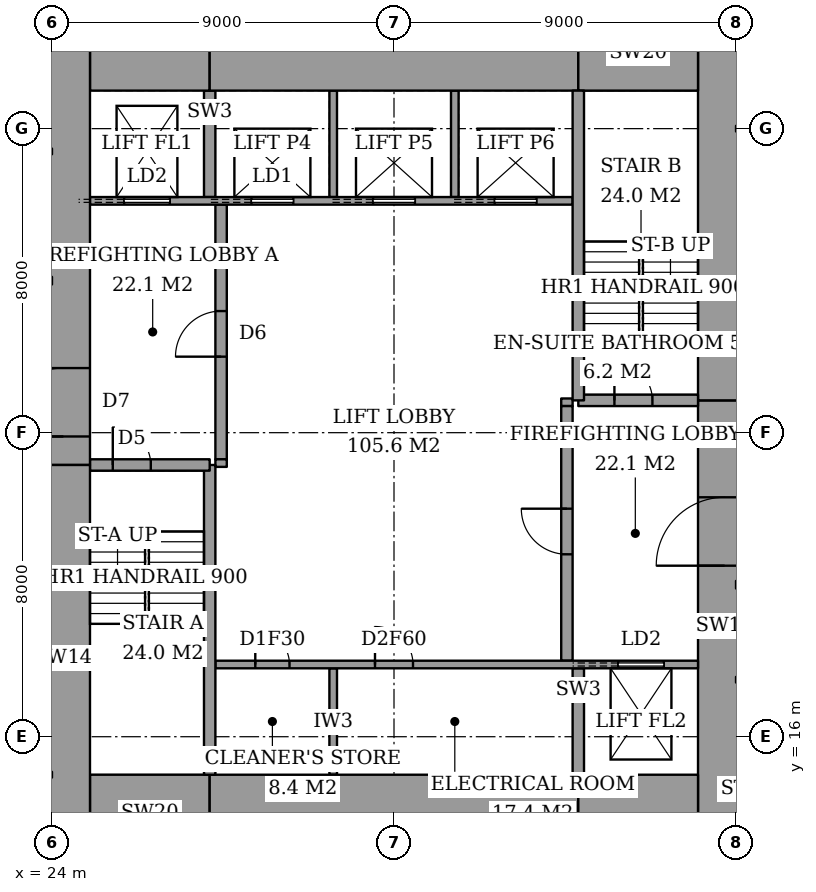
"""IFC4 building model, lengths in metres.
Left out: names, types, materials, properties, quantities, classifications, styles, units other than length and angle.
Written with IfcOpenShell. Run it as: python <this file> out.ifc"""

import sys

from ifc_helpers import new_model, si_unit, direction, frame, frame_2d, origin, place, context, subcontext, project, spatial, rectangle, extrude, element, fill, save


model = new_model("IFC4")
c1 = context("Model", 3, precision=1e-05, world=origin(), true_north=direction((0.0, 1.0)))
c2 = subcontext(c1, "Body", "Model", "MODEL_VIEW")
j1 = project(units=[si_unit("LENGTHUNIT", "METRE"), si_unit("PLANEANGLEUNIT", "RADIAN")], contexts=[c1])
p1 = place(None, origin())
s1 = spatial("IfcSite", under=j1, at=p1, CompositionType="ELEMENT")
p2 = place(p1, origin())
s2 = spatial("IfcBuilding", under=s1, at=p2, CompositionType="ELEMENT")
p3 = place(p2, frame((0.0, 0.0, 214.6)))
s3 = spatial("IfcBuildingStorey", under=s2, at=p3, CompositionType="ELEMENT", Elevation=214.6)
p4 = place(p3, frame((25.0, 14.0, 0.0), z_axis=(0.0, 0.0, 1.0), x_axis=(1.0, 0.0, 0.0)))
e1 = element("IfcWall", 1, at=p4, inside=s3, PredefinedType="SHEAR", context=c2, shape_type="SweptSolid", body=[
    extrude(rectangle(XDim=3.15, YDim=2.0, at=frame_2d((1.575, 0.0))), origin(), (0.0, 0.0, 1.0), 3.6),
])
p5 = place(p3, frame((28.15, 14.0, 0.0), z_axis=(0.0, 0.0, 1.0), x_axis=(1.0, 0.0, 0.0)))
e2 = element("IfcWall", 2, at=p5, inside=s3, PredefinedType="SHEAR", context=c2, shape_type="SweptSolid", body=[
    extrude(rectangle(XDim=9.7, YDim=2.0, at=frame_2d((4.85, 0.0))), origin(), (0.0, 0.0, 1.0), 3.6),
])
for number, where, z_axis, x_axis in (
    (3, (37.85, 14.0, 0.0), (0.0, 0.0, 1.0), (1.0, 0.0, 0.0)),
    (4, (25.0, 34.0, 0.0), (0.0, 0.0, 1.0), (1.0, 0.0, 0.0)),
):
    element("IfcWall", number, at=place(p3, frame(where, z_axis=z_axis, x_axis=x_axis)), inside=s3, PredefinedType="SHEAR", context=c2, shape_type="SweptSolid", body=[
        extrude(rectangle(XDim=3.15, YDim=2.0, at=frame_2d((1.575, 0.0))), origin(), (0.0, 0.0, 1.0), 3.6),
    ])
p6 = place(p3, frame((28.15, 34.0, 0.0), z_axis=(0.0, 0.0, 1.0), x_axis=(1.0, 0.0, 0.0)))
e5 = element("IfcWall", 5, at=p6, inside=s3, PredefinedType="SHEAR", context=c2, shape_type="SweptSolid", body=[
    extrude(rectangle(XDim=9.7, YDim=2.0, at=frame_2d((4.85, 0.0))), origin(), (0.0, 0.0, 1.0), 3.6),
])
p7 = place(p3, frame((37.85, 34.0, 0.0), z_axis=(0.0, 0.0, 1.0), x_axis=(1.0, 0.0, 0.0)))
e6 = element("IfcWall", 6, at=p7, inside=s3, PredefinedType="SHEAR", context=c2, shape_type="SweptSolid", body=[
    extrude(rectangle(XDim=3.15, YDim=2.0, at=frame_2d((1.575, 0.0))), origin(), (0.0, 0.0, 1.0), 3.6),
])
p8 = place(p3, frame((24.3, 13.0, 0.0), z_axis=(0.0, 0.0, 1.0), x_axis=(0.0, 1.0, 0.0)))
e7 = element("IfcWall", 7, at=p8, inside=s3, PredefinedType="SHEAR", context=c2, shape_type="SweptSolid", body=[
    extrude(rectangle(XDim=10.15, YDim=1.4, at=frame_2d((5.075, 0.0))), origin(), (0.0, 0.0, 1.0), 3.6),
])
p9 = place(p3, frame((24.3, 23.15, 0.0), z_axis=(0.0, 0.0, 1.0), x_axis=(0.0, 1.0, 0.0)))
e8 = element("IfcWall", 8, at=p9, inside=s3, PredefinedType="SHEAR", context=c2, shape_type="SweptSolid", body=[
    extrude(rectangle(XDim=11.85, YDim=1.4, at=frame_2d((5.925, 0.0))), origin(), (0.0, 0.0, 1.0), 3.6),
])
p10 = place(p9, frame((0.75, 0.0, 0.0)))
e9 = element("IfcOpeningElement", 9, at=p10, cuts=e8, PredefinedType="OPENING", context=c2, shape_type="SweptSolid", body=[
    extrude(rectangle(XDim=1.8, YDim=2.4, at=frame_2d((0.9, 1.2))), frame((0.0, 0.71, 0.0), z_axis=(0.0, -1.0, 0.0), x_axis=(1.0, 0.0, 0.0)), (0.0, 0.0, 1.0), 1.42),
])
p11 = place(p3, frame((41.7, 13.0, 0.0), z_axis=(0.0, 0.0, 1.0), x_axis=(0.0, 1.0, 0.0)))
e10 = element("IfcWall", 10, at=p11, inside=s3, PredefinedType="SHEAR", context=c2, shape_type="SweptSolid", body=[
    extrude(rectangle(XDim=11.85, YDim=1.4, at=frame_2d((5.925, 0.0))), origin(), (0.0, 0.0, 1.0), 3.6),
])
p12 = place(p11, frame((7.5, 0.0, 0.0)))
e11 = element("IfcOpeningElement", 11, at=p12, cuts=e10, PredefinedType="OPENING", context=c2, shape_type="SweptSolid", body=[
    extrude(rectangle(XDim=1.8, YDim=2.4, at=frame_2d((0.9, 1.2))), frame((0.0, 0.71, 0.0), z_axis=(0.0, -1.0, 0.0), x_axis=(1.0, 0.0, 0.0)), (0.0, 0.0, 1.0), 1.42),
])
p13 = place(p3, frame((41.7, 24.85, 0.0), z_axis=(0.0, 0.0, 1.0), x_axis=(0.0, 1.0, 0.0)))
e12 = element("IfcWall", 12, at=p13, inside=s3, PredefinedType="SHEAR", context=c2, shape_type="SweptSolid", body=[
    extrude(rectangle(XDim=10.15, YDim=1.4, at=frame_2d((5.075, 0.0))), origin(), (0.0, 0.0, 1.0), 3.6),
])
p14 = place(p3, frame((28.15, 15.0, 0.0), z_axis=(0.0, 0.0, 1.0), x_axis=(0.0, 1.0, 0.0)))
e13 = element("IfcWall", 13, at=p14, inside=s3, PredefinedType="SHEAR", context=c2, shape_type="SweptSolid", body=[
    extrude(rectangle(XDim=8.15, YDim=0.3, at=frame_2d((4.075, 0.0))), origin(), (0.0, 0.0, 1.0), 3.6),
])
p15 = place(p3, frame((25.0, 23.15, 0.0), z_axis=(0.0, 0.0, 1.0), x_axis=(1.0, 0.0, 0.0)))
e14 = element("IfcWall", 14, at=p15, inside=s3, PredefinedType="SHEAR", context=c2, shape_type="SweptSolid", body=[
    extrude(rectangle(XDim=3.15, YDim=0.3, at=frame_2d((1.575, 0.0))), origin(), (0.0, 0.0, 1.0), 3.6),
])
p16 = place(p15, frame((0.6, 0.0, 0.0)))
e15 = element("IfcOpeningElement", 15, at=p16, cuts=e14, PredefinedType="OPENING", context=c2, shape_type="SweptSolid", body=[
    extrude(rectangle(XDim=1.0, YDim=2.1, at=frame_2d((0.5, 1.05))), frame((0.0, 0.16, 0.0), z_axis=(0.0, -1.0, 0.0), x_axis=(1.0, 0.0, 0.0)), (0.0, 0.0, 1.0), 0.32),
])
p17 = place(p3, frame((37.85, 24.85, 0.0), z_axis=(0.0, 0.0, 1.0), x_axis=(0.0, 1.0, 0.0)))
e16 = element("IfcWall", 16, at=p17, inside=s3, PredefinedType="SHEAR", context=c2, shape_type="SweptSolid", body=[
    extrude(rectangle(XDim=8.15, YDim=0.3, at=frame_2d((4.075, 0.0))), origin(), (0.0, 0.0, 1.0), 3.6),
])
p18 = place(p3, frame((37.85, 24.85, 0.0), z_axis=(0.0, 0.0, 1.0), x_axis=(1.0, 0.0, 0.0)))
e17 = element("IfcWall", 17, at=p18, inside=s3, PredefinedType="SHEAR", context=c2, shape_type="SweptSolid", body=[
    extrude(rectangle(XDim=3.15, YDim=0.3, at=frame_2d((1.575, 0.0))), origin(), (0.0, 0.0, 1.0), 3.6),
])
p19 = place(p18, frame((0.95, 0.0, 0.0)))
e18 = element("IfcOpeningElement", 18, at=p19, cuts=e17, PredefinedType="OPENING", context=c2, shape_type="SweptSolid", body=[
    extrude(rectangle(XDim=1.0, YDim=2.1, at=frame_2d((0.5, 1.05))), frame((0.0, 0.16, 0.0), z_axis=(0.0, -1.0, 0.0), x_axis=(1.0, 0.0, 0.0)), (0.0, 0.0, 1.0), 0.32),
])
p20 = place(p3, frame((28.45, 23.3, 0.0), z_axis=(0.0, 0.0, 1.0), x_axis=(0.0, 1.0, 0.0)))
e19 = element("IfcWall", 19, at=p20, inside=s3, PredefinedType="PARTITIONING", context=c2, shape_type="SweptSolid", body=[
    extrude(rectangle(XDim=6.7, YDim=0.3, at=frame_2d((3.35, 0.0))), origin(), (0.0, 0.0, 1.0), 3.6),
])
p21 = place(p20, frame((2.7, 0.0, 0.0)))
e20 = element("IfcOpeningElement", 20, at=p21, cuts=e19, PredefinedType="OPENING", context=c2, shape_type="SweptSolid", body=[
    extrude(rectangle(XDim=1.2, YDim=2.1, at=frame_2d((0.6, 1.05))), frame((0.0, 0.16, 0.0), z_axis=(0.0, -1.0, 0.0), x_axis=(1.0, 0.0, 0.0)), (0.0, 0.0, 1.0), 0.32),
])
p22 = place(p3, frame((37.55, 18.0, 0.0), z_axis=(0.0, 0.0, 1.0), x_axis=(0.0, 1.0, 0.0)))
e21 = element("IfcWall", 21, at=p22, inside=s3, PredefinedType="PARTITIONING", context=c2, shape_type="SweptSolid", body=[
    extrude(rectangle(XDim=6.7, YDim=0.3, at=frame_2d((3.35, 0.0))), origin(), (0.0, 0.0, 1.0), 3.6),
])
p23 = place(p22, frame((2.8, 0.0, 0.0)))
e22 = element("IfcOpeningElement", 22, at=p23, cuts=e21, PredefinedType="OPENING", context=c2, shape_type="SweptSolid", body=[
    extrude(rectangle(XDim=1.2, YDim=2.1, at=frame_2d((0.6, 1.05))), frame((0.0, 0.16, 0.0), z_axis=(0.0, -1.0, 0.0), x_axis=(1.0, 0.0, 0.0)), (0.0, 0.0, 1.0), 0.32),
])
p24 = place(p3, frame((28.3, 17.9, 0.0), z_axis=(0.0, 0.0, 1.0), x_axis=(1.0, 0.0, 0.0)))
e23 = element("IfcWall", 23, at=p24, inside=s3, PredefinedType="PARTITIONING", context=c2, shape_type="SweptSolid", body=[
    extrude(rectangle(XDim=12.7, YDim=0.2, at=frame_2d((6.35, 0.0))), origin(), (0.0, 0.0, 1.0), 3.6),
])
p25 = place(p24, frame((1.05, 0.0, 0.0)))
e24 = element("IfcOpeningElement", 24, at=p25, cuts=e23, PredefinedType="OPENING", context=c2, shape_type="SweptSolid", body=[
    extrude(rectangle(XDim=0.9, YDim=2.1, at=frame_2d((0.45, 1.05))), frame((0.0, 0.11, 0.0), z_axis=(0.0, -1.0, 0.0), x_axis=(1.0, 0.0, 0.0)), (0.0, 0.0, 1.0), 0.22),
])
p26 = place(p24, frame((4.2, 0.0, 0.0)))
e25 = element("IfcOpeningElement", 25, at=p26, cuts=e23, PredefinedType="OPENING", context=c2, shape_type="SweptSolid", body=[
    extrude(rectangle(XDim=1.0, YDim=2.1, at=frame_2d((0.5, 1.05))), frame((0.0, 0.11, 0.0), z_axis=(0.0, -1.0, 0.0), x_axis=(1.0, 0.0, 0.0)), (0.0, 0.0, 1.0), 0.22),
])
p27 = place(p24, frame((10.6, 0.0, 0.0)))
e26 = element("IfcOpeningElement", 26, at=p27, cuts=e23, PredefinedType="OPENING", context=c2, shape_type="SweptSolid", body=[
    extrude(rectangle(XDim=1.2, YDim=2.1, at=frame_2d((0.6, 1.05))), frame((0.0, 0.11, 0.0), z_axis=(0.0, -1.0, 0.0), x_axis=(1.0, 0.0, 0.0)), (0.0, 0.0, 1.0), 0.22),
])
p28 = place(p3, frame((25.0, 30.1, 0.0), z_axis=(0.0, 0.0, 1.0), x_axis=(1.0, 0.0, 0.0)))
e27 = element("IfcWall", 27, at=p28, inside=s3, PredefinedType="PARTITIONING", context=c2, shape_type="SweptSolid", body=[
    extrude(rectangle(XDim=12.7, YDim=0.2, at=frame_2d((6.35, 0.0))), origin(), (0.0, 0.0, 1.0), 3.6),
])
p29 = place(p28, frame((4.25, 0.0, 0.0)))
e28 = element("IfcOpeningElement", 28, at=p29, cuts=e27, PredefinedType="OPENING", context=c2, shape_type="SweptSolid", body=[
    extrude(rectangle(XDim=1.1, YDim=2.1, at=frame_2d((0.55, 1.05))), frame((0.0, 0.11, 0.0), z_axis=(0.0, -1.0, 0.0), x_axis=(1.0, 0.0, 0.0)), (0.0, 0.0, 1.0), 0.22),
])
p30 = place(p28, frame((7.45, 0.0, 0.0)))
e29 = element("IfcOpeningElement", 29, at=p30, cuts=e27, PredefinedType="OPENING", context=c2, shape_type="SweptSolid", body=[
    extrude(rectangle(XDim=1.1, YDim=2.1, at=frame_2d((0.55, 1.05))), frame((0.0, 0.11, 0.0), z_axis=(0.0, -1.0, 0.0), x_axis=(1.0, 0.0, 0.0)), (0.0, 0.0, 1.0), 0.22),
])
p31 = place(p28, frame((10.65, 0.0, 0.0)))
e30 = element("IfcOpeningElement", 30, at=p31, cuts=e27, PredefinedType="OPENING", context=c2, shape_type="SweptSolid", body=[
    extrude(rectangle(XDim=1.1, YDim=2.1, at=frame_2d((0.55, 1.05))), frame((0.0, 0.11, 0.0), z_axis=(0.0, -1.0, 0.0), x_axis=(1.0, 0.0, 0.0)), (0.0, 0.0, 1.0), 0.22),
])
p32 = place(p28, frame((0.9, 0.0, 0.0)))
e31 = element("IfcOpeningElement", 31, at=p32, cuts=e27, PredefinedType="OPENING", context=c2, shape_type="SweptSolid", body=[
    extrude(rectangle(XDim=1.2, YDim=2.1, at=frame_2d((0.6, 1.05))), frame((0.0, 0.11, 0.0), z_axis=(0.0, -1.0, 0.0), x_axis=(1.0, 0.0, 0.0)), (0.0, 0.0, 1.0), 0.22),
])
p33 = place(p3, frame((31.4, 15.0, 0.0), z_axis=(0.0, 0.0, 1.0), x_axis=(0.0, 1.0, 0.0)))
e32 = element("IfcWall", 32, at=p33, inside=s3, PredefinedType="PARTITIONING", context=c2, shape_type="SweptSolid", body=[
    extrude(rectangle(XDim=2.8, YDim=0.2, at=frame_2d((1.4, 0.0))), origin(), (0.0, 0.0, 1.0), 3.6),
])
p34 = place(p3, frame((37.85, 15.0, 0.0), z_axis=(0.0, 0.0, 1.0), x_axis=(0.0, 1.0, 0.0)))
e33 = element("IfcWall", 33, at=p34, inside=s3, PredefinedType="SHEAR", context=c2, shape_type="SweptSolid", body=[
    extrude(rectangle(XDim=2.8, YDim=0.3, at=frame_2d((1.4, 0.0))), origin(), (0.0, 0.0, 1.0), 3.6),
])
for number, where, z_axis, x_axis in (
    (34, (31.4, 30.2, 0.0), (0.0, 0.0, 1.0), (0.0, 1.0, 0.0)),
    (35, (34.6, 30.2, 0.0), (0.0, 0.0, 1.0), (0.0, 1.0, 0.0)),
):
    element("IfcWall", number, at=place(p3, frame(where, z_axis=z_axis, x_axis=x_axis)), inside=s3, PredefinedType="PARTITIONING", context=c2, shape_type="SweptSolid", body=[
        extrude(rectangle(XDim=2.8, YDim=0.2, at=frame_2d((1.4, 0.0))), origin(), (0.0, 0.0, 1.0), 3.6),
    ])
p35 = place(p3, frame((28.15, 30.2, 0.0), z_axis=(0.0, 0.0, 1.0), x_axis=(0.0, 1.0, 0.0)))
e36 = element("IfcWall", 36, at=p35, inside=s3, PredefinedType="SHEAR", context=c2, shape_type="SweptSolid", body=[
    extrude(rectangle(XDim=2.8, YDim=0.3, at=frame_2d((1.4, 0.0))), origin(), (0.0, 0.0, 1.0), 3.6),
])
for number, where, z_axis, x_axis in (
    (37, (28.3, 23.2, 0.0), (0.0, 0.0, 1.0), (1.0, 0.0, 0.0)),
    (38, (37.4, 24.8, 0.0), (0.0, 0.0, 1.0), (1.0, 0.0, 0.0)),
):
    element("IfcWall", number, at=place(p3, frame(where, z_axis=z_axis, x_axis=x_axis)), inside=s3, PredefinedType="PARTITIONING", context=c2, shape_type="SweptSolid", body=[
        extrude(rectangle(XDim=0.3, YDim=0.2, at=frame_2d((0.15, 0.0))), origin(), (0.0, 0.0, 1.0), 3.6),
    ])
p36 = place(p16, origin())
e39 = element("IfcDoor", 39, at=p36, inside=s3, OperationType="SINGLE_SWING_RIGHT", PredefinedType="DOOR", context=c2, shape_type="SweptSolid", body=[
    extrude(rectangle(XDim=1.0, YDim=2.1, at=frame_2d((0.5, 1.05))), frame((0.0, 0.025, 0.0), z_axis=(0.0, -1.0, 0.0), x_axis=(1.0, 0.0, 0.0)), (0.0, 0.0, 1.0), 0.05),
])
fill(e15, e39)
p37 = place(p19, origin())
e40 = element("IfcDoor", 40, at=p37, inside=s3, OperationType="SINGLE_SWING_RIGHT", PredefinedType="DOOR", context=c2, shape_type="SweptSolid", body=[
    extrude(rectangle(XDim=1.0, YDim=2.1, at=frame_2d((0.5, 1.05))), frame((0.0, 0.025, 0.0), z_axis=(0.0, -1.0, 0.0), x_axis=(1.0, 0.0, 0.0)), (0.0, 0.0, 1.0), 0.05),
])
fill(e18, e40)
p38 = place(p21, origin())
e41 = element("IfcDoor", 41, at=p38, inside=s3, OperationType="SINGLE_SWING_RIGHT", PredefinedType="DOOR", context=c2, shape_type="SweptSolid", body=[
    extrude(rectangle(XDim=1.2, YDim=2.1, at=frame_2d((0.6, 1.05))), frame((0.0, 0.025, 0.0), z_axis=(0.0, -1.0, 0.0), x_axis=(1.0, 0.0, 0.0)), (0.0, 0.0, 1.0), 0.05),
])
fill(e20, e41)
p39 = place(p23, origin())
e42 = element("IfcDoor", 42, at=p39, inside=s3, OperationType="SINGLE_SWING_LEFT", PredefinedType="DOOR", context=c2, shape_type="SweptSolid", body=[
    extrude(rectangle(XDim=1.2, YDim=2.1, at=frame_2d((0.6, 1.05))), frame((0.0, 0.025, 0.0), z_axis=(0.0, -1.0, 0.0), x_axis=(1.0, 0.0, 0.0)), (0.0, 0.0, 1.0), 0.05),
])
fill(e22, e42)
p40 = place(p10, origin())
e43 = element("IfcDoor", 43, at=p40, inside=s3, OperationType="DOUBLE_DOOR_DOUBLE_SWING", PredefinedType="DOOR", context=c2, shape_type="SweptSolid", body=[
    extrude(rectangle(XDim=1.8, YDim=2.4, at=frame_2d((0.9, 1.2))), frame((0.0, 0.025, 0.0), z_axis=(0.0, -1.0, 0.0), x_axis=(1.0, 0.0, 0.0)), (0.0, 0.0, 1.0), 0.05),
])
fill(e9, e43)
p41 = place(p12, origin())
e44 = element("IfcDoor", 44, at=p41, inside=s3, OperationType="DOUBLE_DOOR_DOUBLE_SWING", PredefinedType="DOOR", context=c2, shape_type="SweptSolid", body=[
    extrude(rectangle(XDim=1.8, YDim=2.4, at=frame_2d((0.9, 1.2))), frame((0.0, 0.025, 0.0), z_axis=(0.0, -1.0, 0.0), x_axis=(1.0, 0.0, 0.0)), (0.0, 0.0, 1.0), 0.05),
])
fill(e11, e44)
p42 = place(p25, origin())
e45 = element("IfcDoor", 45, at=p42, inside=s3, OperationType="SINGLE_SWING_RIGHT", PredefinedType="DOOR", context=c2, shape_type="SweptSolid", body=[
    extrude(rectangle(XDim=0.9, YDim=2.1, at=frame_2d((0.45, 1.05))), frame((0.0, 0.025, 0.0), z_axis=(0.0, -1.0, 0.0), x_axis=(1.0, 0.0, 0.0)), (0.0, 0.0, 1.0), 0.05),
])
fill(e24, e45)
p43 = place(p26, origin())
e46 = element("IfcDoor", 46, at=p43, inside=s3, OperationType="SINGLE_SWING_RIGHT", PredefinedType="DOOR", context=c2, shape_type="SweptSolid", body=[
    extrude(rectangle(XDim=1.0, YDim=2.1, at=frame_2d((0.5, 1.05))), frame((0.0, 0.025, 0.0), z_axis=(0.0, -1.0, 0.0), x_axis=(1.0, 0.0, 0.0)), (0.0, 0.0, 1.0), 0.05),
])
fill(e25, e46)
p44 = place(p29, origin())
e47 = element("IfcDoor", 47, at=p44, inside=s3, OperationType="SLIDING_TO_LEFT", PredefinedType="DOOR", context=c2, shape_type="SweptSolid", body=[
    extrude(rectangle(XDim=1.1, YDim=2.1, at=frame_2d((0.55, 1.05))), frame((0.0, 0.025, 0.0), z_axis=(0.0, -1.0, 0.0), x_axis=(1.0, 0.0, 0.0)), (0.0, 0.0, 1.0), 0.05),
])
fill(e28, e47)
p45 = place(p30, origin())
e48 = element("IfcDoor", 48, at=p45, inside=s3, OperationType="SLIDING_TO_LEFT", PredefinedType="DOOR", context=c2, shape_type="SweptSolid", body=[
    extrude(rectangle(XDim=1.1, YDim=2.1, at=frame_2d((0.55, 1.05))), frame((0.0, 0.025, 0.0), z_axis=(0.0, -1.0, 0.0), x_axis=(1.0, 0.0, 0.0)), (0.0, 0.0, 1.0), 0.05),
])
fill(e29, e48)
p46 = place(p31, origin())
e49 = element("IfcDoor", 49, at=p46, inside=s3, OperationType="SLIDING_TO_LEFT", PredefinedType="DOOR", context=c2, shape_type="SweptSolid", body=[
    extrude(rectangle(XDim=1.1, YDim=2.1, at=frame_2d((0.55, 1.05))), frame((0.0, 0.025, 0.0), z_axis=(0.0, -1.0, 0.0), x_axis=(1.0, 0.0, 0.0)), (0.0, 0.0, 1.0), 0.05),
])
fill(e30, e49)
p47 = place(p32, origin())
e50 = element("IfcDoor", 50, at=p47, inside=s3, OperationType="SLIDING_TO_LEFT", PredefinedType="DOOR", context=c2, shape_type="SweptSolid", body=[
    extrude(rectangle(XDim=1.2, YDim=2.1, at=frame_2d((0.6, 1.05))), frame((0.0, 0.025, 0.0), z_axis=(0.0, -1.0, 0.0), x_axis=(1.0, 0.0, 0.0)), (0.0, 0.0, 1.0), 0.05),
])
fill(e31, e50)
p48 = place(p27, origin())
e51 = element("IfcDoor", 51, at=p48, inside=s3, OperationType="SLIDING_TO_LEFT", PredefinedType="DOOR", context=c2, shape_type="SweptSolid", body=[
    extrude(rectangle(XDim=1.2, YDim=2.1, at=frame_2d((0.6, 1.05))), frame((0.0, 0.025, 0.0), z_axis=(0.0, -1.0, 0.0), x_axis=(1.0, 0.0, 0.0)), (0.0, 0.0, 1.0), 0.05),
])
fill(e26, e51)
save(model, sys.argv[1])
